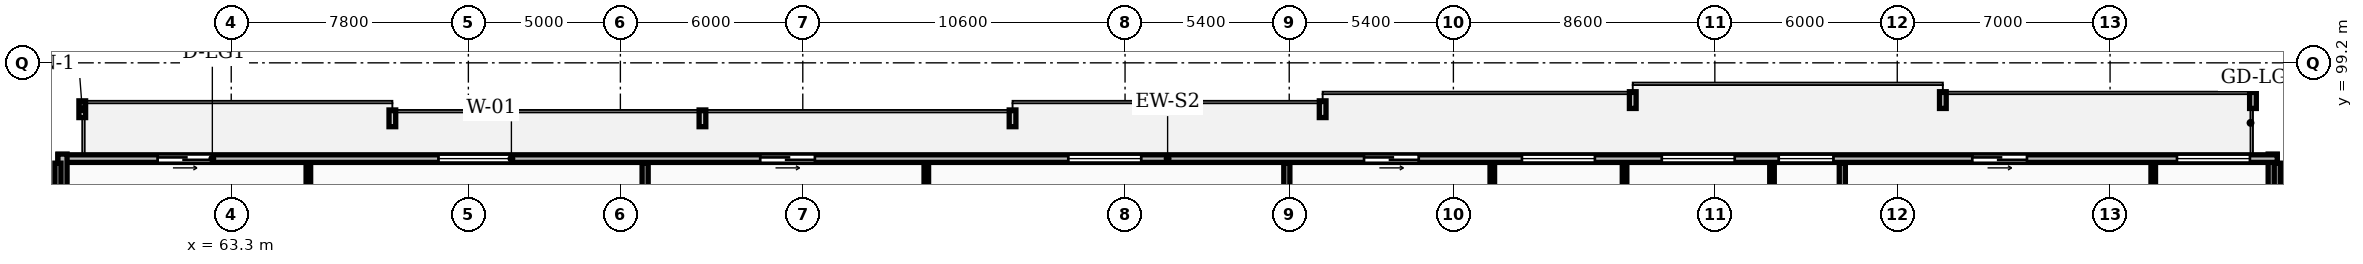
"""IFC4 building model, lengths in metres.
Left out: names, types, materials, properties, quantities, classifications, styles, units other than length and angle.
Written with IfcOpenShell. Run it as: python <this file> out.ifc"""

import sys

from ifc_helpers import new_model, si_unit, direction, frame, frame_2d, origin, place, context, subcontext, project, spatial, rectangle, extrude, element, fill, save


model = new_model("IFC4")
c1 = context("Model", 3, precision=1e-05, world=origin(), true_north=direction((0.0, 1.0)))
c2 = subcontext(c1, "Body", "Model", "MODEL_VIEW")
j1 = project(units=[si_unit("LENGTHUNIT", "METRE"), si_unit("PLANEANGLEUNIT", "RADIAN")], contexts=[c1])
p1 = place(None, origin())
s1 = spatial("IfcSite", under=j1, at=p1, CompositionType="ELEMENT")
p2 = place(p1, origin())
s2 = spatial("IfcBuilding", under=s1, at=p2, CompositionType="ELEMENT")
p3 = place(p2, frame((0.0, 0.0, 142.9)))
s3 = spatial("IfcBuildingStorey", under=s2, at=p3, CompositionType="ELEMENT", Elevation=142.9)
p4 = place(p3, frame((130.45, 92.6, 0.0), z_axis=(0.0, 0.0, 1.0), x_axis=(0.0, 1.0, 0.0)))
e1 = element("IfcWall", 1, at=p4, inside=s3, PredefinedType="STANDARD", context=c2, shape_type="SweptSolid", body=[
    extrude(rectangle(XDim=3.6, YDim=0.3, at=frame_2d((1.8, 0.0))), origin(), (0.0, 0.0, 1.0), 3.31),
])
p5 = place(p3, frame((130.6, 96.05, 0.0), z_axis=(0.0, 0.0, 1.0), x_axis=(-1.0, 0.0, 0.0)))
e2 = element("IfcWall", 2, at=p5, inside=s3, PredefinedType="STANDARD", context=c2, shape_type="SweptSolid", body=[
    extrude(rectangle(XDim=73.0, YDim=0.25, at=frame_2d((36.5, 0.0))), origin(), (0.0, 0.0, 1.0), 3.31),
])
p6 = place(p5, frame((67.921, 0.0, 0.0)))
e3 = element("IfcOpeningElement", 3, at=p6, cuts=e2, PredefinedType="OPENING", context=c2, shape_type="SweptSolid", body=[
    extrude(rectangle(XDim=1.8, YDim=2.2, at=frame_2d((0.9, 1.1))), frame((0.0, 0.135, 0.0), z_axis=(0.0, -1.0, 0.0), x_axis=(1.0, 0.0, 0.0)), (0.0, 0.0, 1.0), 0.27),
])
p7 = place(p5, frame((58.084, 0.0, 0.85)))
e4 = element("IfcOpeningElement", 4, at=p7, cuts=e2, PredefinedType="OPENING", context=c2, shape_type="SweptSolid", body=[
    extrude(rectangle(XDim=2.4, YDim=1.9, at=frame_2d((1.2, 0.95))), frame((0.0, 0.135, 0.0), z_axis=(0.0, -1.0, 0.0), x_axis=(1.0, 0.0, 0.0)), (0.0, 0.0, 1.0), 0.27),
])
p8 = place(p5, frame((48.101, 0.0, 0.0)))
e5 = element("IfcOpeningElement", 5, at=p8, cuts=e2, PredefinedType="OPENING", context=c2, shape_type="SweptSolid", body=[
    extrude(rectangle(XDim=1.8, YDim=2.2, at=frame_2d((0.9, 1.1))), frame((0.0, 0.135, 0.0), z_axis=(0.0, -1.0, 0.0), x_axis=(1.0, 0.0, 0.0)), (0.0, 0.0, 1.0), 0.27),
])
p9 = place(p5, frame((37.368, 0.0, 0.85)))
e6 = element("IfcOpeningElement", 6, at=p9, cuts=e2, PredefinedType="OPENING", context=c2, shape_type="SweptSolid", body=[
    extrude(rectangle(XDim=2.4, YDim=1.9, at=frame_2d((1.2, 0.95))), frame((0.0, 0.135, 0.0), z_axis=(0.0, -1.0, 0.0), x_axis=(1.0, 0.0, 0.0)), (0.0, 0.0, 1.0), 0.27),
])
p10 = place(p5, frame((22.445, 0.0, 0.85)))
e7 = element("IfcOpeningElement", 7, at=p10, cuts=e2, PredefinedType="OPENING", context=c2, shape_type="SweptSolid", body=[
    extrude(rectangle(XDim=2.4, YDim=1.9, at=frame_2d((1.2, 0.95))), frame((0.0, 0.135, 0.0), z_axis=(0.0, -1.0, 0.0), x_axis=(1.0, 0.0, 0.0)), (0.0, 0.0, 1.0), 0.27),
])
p11 = place(p5, frame((17.845, 0.0, 0.85)))
e8 = element("IfcOpeningElement", 8, at=p11, cuts=e2, PredefinedType="OPENING", context=c2, shape_type="SweptSolid", body=[
    extrude(rectangle(XDim=2.4, YDim=1.9, at=frame_2d((1.2, 0.95))), frame((0.0, 0.135, 0.0), z_axis=(0.0, -1.0, 0.0), x_axis=(1.0, 0.0, 0.0)), (0.0, 0.0, 1.0), 0.27),
])
p12 = place(p5, frame((28.239, 0.0, 0.0)))
e9 = element("IfcOpeningElement", 9, at=p12, cuts=e2, PredefinedType="OPENING", context=c2, shape_type="SweptSolid", body=[
    extrude(rectangle(XDim=1.8, YDim=2.2, at=frame_2d((0.9, 1.1))), frame((0.0, 0.135, 0.0), z_axis=(0.0, -1.0, 0.0), x_axis=(1.0, 0.0, 0.0)), (0.0, 0.0, 1.0), 0.27),
])
p13 = place(p5, frame((14.599, 0.0, 0.85)))
e10 = element("IfcOpeningElement", 10, at=p13, cuts=e2, PredefinedType="OPENING", context=c2, shape_type="SweptSolid", body=[
    extrude(rectangle(XDim=1.8, YDim=1.8, at=frame_2d((0.9, 0.9))), frame((0.0, 0.135, 0.0), z_axis=(0.0, -1.0, 0.0), x_axis=(1.0, 0.0, 0.0)), (0.0, 0.0, 1.0), 0.27),
])
p14 = place(p5, frame((8.234, 0.0, 0.0)))
e11 = element("IfcOpeningElement", 11, at=p14, cuts=e2, PredefinedType="OPENING", context=c2, shape_type="SweptSolid", body=[
    extrude(rectangle(XDim=1.8, YDim=2.2, at=frame_2d((0.9, 1.1))), frame((0.0, 0.135, 0.0), z_axis=(0.0, -1.0, 0.0), x_axis=(1.0, 0.0, 0.0)), (0.0, 0.0, 1.0), 0.27),
])
p15 = place(p5, frame((0.9, 0.0, 0.85)))
e12 = element("IfcOpeningElement", 12, at=p15, cuts=e2, PredefinedType="OPENING", context=c2, shape_type="SweptSolid", body=[
    extrude(rectangle(XDim=2.4, YDim=1.9, at=frame_2d((1.2, 0.95))), frame((0.0, 0.135, 0.0), z_axis=(0.0, -1.0, 0.0), x_axis=(1.0, 0.0, 0.0)), (0.0, 0.0, 1.0), 0.27),
])
p16 = place(p3, frame((57.75, 96.2, 0.0), z_axis=(0.0, 0.0, 1.0), x_axis=(0.0, -1.0, 0.0)))
e13 = element("IfcWall", 13, at=p16, inside=s3, PredefinedType="STANDARD", context=c2, shape_type="SweptSolid", body=[
    extrude(rectangle(XDim=3.6, YDim=0.3, at=frame_2d((1.8, 0.0))), origin(), (0.0, 0.0, 1.0), 3.31),
])
for number, where, z_axis, x_axis in (
    (14, (57.6, 69.83, 0.0), (0.0, 0.0, 1.0), (0.0, 1.0, 0.0)),
    (15, (130.6, 69.83, 0.0), (0.0, 0.0, 1.0), (0.0, 1.0, 0.0)),
    (16, (76.914, 69.83, 0.0), (0.0, 0.0, 1.0), (0.0, 1.0, 0.0)),
):
    element("IfcWall", number, at=place(p3, frame(where, z_axis=z_axis, x_axis=x_axis)), inside=s3, PredefinedType="PARTITIONING", context=c2, shape_type="SweptSolid", body=[
        extrude(rectangle(XDim=26.07, YDim=0.2, at=frame_2d((13.035, 0.0))), origin(), (0.0, 0.0, 1.0), 3.31),
    ])
p17 = place(p3, frame((65.837, 91.08, 0.0), z_axis=(0.0, 0.0, 1.0), x_axis=(0.0, 1.0, 0.0)))
e17 = element("IfcWall", 17, at=p17, inside=s3, PredefinedType="PARTITIONING", context=c2, shape_type="SweptSolid", body=[
    extrude(rectangle(XDim=4.82, YDim=0.15, at=frame_2d((2.41, 0.0))), origin(), (0.0, 0.0, 1.0), 3.31),
])
p18 = place(p3, frame((98.021, 69.83, 0.0), z_axis=(0.0, 0.0, 1.0), x_axis=(0.0, 1.0, 0.0)))
e18 = element("IfcWall", 18, at=p18, inside=s3, PredefinedType="PARTITIONING", context=c2, shape_type="SweptSolid", body=[
    extrude(rectangle(XDim=26.07, YDim=0.2, at=frame_2d((13.035, 0.0))), origin(), (0.0, 0.0, 1.0), 3.31),
])
p19 = place(p3, frame((86.163, 91.08, 0.0), z_axis=(0.0, 0.0, 1.0), x_axis=(0.0, 1.0, 0.0)))
e19 = element("IfcWall", 19, at=p19, inside=s3, PredefinedType="PARTITIONING", context=c2, shape_type="SweptSolid", body=[
    extrude(rectangle(XDim=4.82, YDim=0.15, at=frame_2d((2.41, 0.0))), origin(), (0.0, 0.0, 1.0), 3.31),
])
p20 = place(p3, frame((116.293, 69.83, 0.0), z_axis=(0.0, 0.0, 1.0), x_axis=(0.0, 1.0, 0.0)))
e20 = element("IfcWall", 20, at=p20, inside=s3, PredefinedType="PARTITIONING", context=c2, shape_type="SweptSolid", body=[
    extrude(rectangle(XDim=26.07, YDim=0.2, at=frame_2d((13.035, 0.0))), origin(), (0.0, 0.0, 1.0), 3.31),
])
p21 = place(p3, frame((109.13, 91.08, 0.0), z_axis=(0.0, 0.0, 1.0), x_axis=(0.0, 1.0, 0.0)))
e21 = element("IfcWall", 21, at=p21, inside=s3, PredefinedType="PARTITIONING", context=c2, shape_type="SweptSolid", body=[
    extrude(rectangle(XDim=4.82, YDim=0.15, at=frame_2d((2.41, 0.0))), origin(), (0.0, 0.0, 1.0), 3.31),
])
p22 = place(p3, frame((104.78, 85.94, 0.0), z_axis=(0.0, 0.0, 1.0), x_axis=(0.0, 1.0, 0.0)))
e22 = element("IfcWall", 22, at=p22, inside=s3, PredefinedType="PARTITIONING", context=c2, shape_type="SweptSolid", body=[
    extrude(rectangle(XDim=9.96, YDim=0.15, at=frame_2d((4.98, 0.0))), origin(), (0.0, 0.0, 1.0), 3.31),
])
p23 = place(p22, frame((2.936, 0.0, 0.0)))
e23 = element("IfcOpeningElement", 23, at=p23, cuts=e22, PredefinedType="OPENING", context=c2, shape_type="SweptSolid", body=[
    extrude(rectangle(XDim=0.92, YDim=2.08, at=frame_2d((0.46, 1.04))), frame((0.0, 0.085, 0.0), z_axis=(0.0, -1.0, 0.0), x_axis=(1.0, 0.0, 0.0)), (0.0, 0.0, 1.0), 0.17),
])
p24 = place(p3, frame((113.98, 88.67, 0.0), z_axis=(0.0, 0.0, 1.0), x_axis=(0.0, 1.0, 0.0)))
e24 = element("IfcWall", 24, at=p24, inside=s3, PredefinedType="PARTITIONING", context=c2, shape_type="SweptSolid", body=[
    extrude(rectangle(XDim=7.23, YDim=0.15, at=frame_2d((3.615, 0.0))), origin(), (0.0, 0.0, 1.0), 3.31),
])
p25 = place(p24, frame((0.26, 0.0, 0.0)))
e25 = element("IfcOpeningElement", 25, at=p25, cuts=e24, PredefinedType="OPENING", context=c2, shape_type="SweptSolid", body=[
    extrude(rectangle(XDim=0.92, YDim=2.08, at=frame_2d((0.46, 1.04))), frame((0.0, 0.085, 0.0), z_axis=(0.0, -1.0, 0.0), x_axis=(1.0, 0.0, 0.0)), (0.0, 0.0, 1.0), 0.17),
])
p26 = place(p3, frame((126.52, 85.94, 0.0), z_axis=(0.0, 0.0, 1.0), x_axis=(0.0, 1.0, 0.0)))
e26 = element("IfcWall", 26, at=p26, inside=s3, PredefinedType="PARTITIONING", context=c2, shape_type="SweptSolid", body=[
    extrude(rectangle(XDim=9.96, YDim=0.15, at=frame_2d((4.98, 0.0))), origin(), (0.0, 0.0, 1.0), 3.31),
])
p27 = place(p26, frame((1.43, 0.0, 0.0)))
e27 = element("IfcOpeningElement", 27, at=p27, cuts=e26, PredefinedType="OPENING", context=c2, shape_type="SweptSolid", body=[
    extrude(rectangle(XDim=0.84, YDim=2.04, at=frame_2d((0.42, 1.02))), frame((0.0, 0.085, 0.0), z_axis=(0.0, -1.0, 0.0), x_axis=(1.0, 0.0, 0.0)), (0.0, 0.0, 1.0), 0.17),
])
p28 = place(p26, frame((3.002, 0.0, 0.0)))
e28 = element("IfcOpeningElement", 28, at=p28, cuts=e26, PredefinedType="OPENING", context=c2, shape_type="SweptSolid", body=[
    extrude(rectangle(XDim=0.84, YDim=2.04, at=frame_2d((0.42, 1.02))), frame((0.0, 0.085, 0.0), z_axis=(0.0, -1.0, 0.0), x_axis=(1.0, 0.0, 0.0)), (0.0, 0.0, 1.0), 0.17),
])
p29 = place(p26, frame((6.669, 0.0, 0.0)))
e29 = element("IfcOpeningElement", 29, at=p29, cuts=e26, PredefinedType="OPENING", context=c2, shape_type="SweptSolid", body=[
    extrude(rectangle(XDim=0.88, YDim=2.06, at=frame_2d((0.44, 1.03))), frame((0.0, 0.085, 0.0), z_axis=(0.0, -1.0, 0.0), x_axis=(1.0, 0.0, 0.0)), (0.0, 0.0, 1.0), 0.17),
])
p30 = place(p6, origin())
e30 = element("IfcDoor", 30, at=p30, inside=s3, OperationType="SLIDING_TO_LEFT", PredefinedType="DOOR", context=c2, shape_type="SweptSolid", body=[
    extrude(rectangle(XDim=1.8, YDim=2.2, at=frame_2d((0.9, 1.1))), frame((0.0, 0.025, 0.0), z_axis=(0.0, -1.0, 0.0), x_axis=(1.0, 0.0, 0.0)), (0.0, 0.0, 1.0), 0.05),
])
fill(e3, e30)
p31 = place(p7, origin())
e31 = element("IfcWindow", 31, at=p31, inside=s3, PartitioningType="DOUBLE_PANEL_VERTICAL", PredefinedType="WINDOW", context=c2, shape_type="SweptSolid", body=[
    extrude(rectangle(XDim=2.4, YDim=1.9, at=frame_2d((1.2, 0.95))), frame((0.0, 0.03, 0.0), z_axis=(0.0, -1.0, 0.0), x_axis=(1.0, 0.0, 0.0)), (0.0, 0.0, 1.0), 0.06),
])
fill(e4, e31)
p32 = place(p8, origin())
e32 = element("IfcDoor", 32, at=p32, inside=s3, OperationType="SLIDING_TO_LEFT", PredefinedType="DOOR", context=c2, shape_type="SweptSolid", body=[
    extrude(rectangle(XDim=1.8, YDim=2.2, at=frame_2d((0.9, 1.1))), frame((0.0, 0.025, 0.0), z_axis=(0.0, -1.0, 0.0), x_axis=(1.0, 0.0, 0.0)), (0.0, 0.0, 1.0), 0.05),
])
fill(e5, e32)
p33 = place(p9, origin())
e33 = element("IfcWindow", 33, at=p33, inside=s3, PartitioningType="DOUBLE_PANEL_VERTICAL", PredefinedType="WINDOW", context=c2, shape_type="SweptSolid", body=[
    extrude(rectangle(XDim=2.4, YDim=1.9, at=frame_2d((1.2, 0.95))), frame((0.0, 0.03, 0.0), z_axis=(0.0, -1.0, 0.0), x_axis=(1.0, 0.0, 0.0)), (0.0, 0.0, 1.0), 0.06),
])
fill(e6, e33)
p34 = place(p10, origin())
e34 = element("IfcWindow", 34, at=p34, inside=s3, PartitioningType="DOUBLE_PANEL_VERTICAL", PredefinedType="WINDOW", context=c2, shape_type="SweptSolid", body=[
    extrude(rectangle(XDim=2.4, YDim=1.9, at=frame_2d((1.2, 0.95))), frame((0.0, 0.03, 0.0), z_axis=(0.0, -1.0, 0.0), x_axis=(1.0, 0.0, 0.0)), (0.0, 0.0, 1.0), 0.06),
])
fill(e7, e34)
p35 = place(p11, origin())
e35 = element("IfcWindow", 35, at=p35, inside=s3, PartitioningType="DOUBLE_PANEL_VERTICAL", PredefinedType="WINDOW", context=c2, shape_type="SweptSolid", body=[
    extrude(rectangle(XDim=2.4, YDim=1.9, at=frame_2d((1.2, 0.95))), frame((0.0, 0.03, 0.0), z_axis=(0.0, -1.0, 0.0), x_axis=(1.0, 0.0, 0.0)), (0.0, 0.0, 1.0), 0.06),
])
fill(e8, e35)
p36 = place(p12, origin())
e36 = element("IfcDoor", 36, at=p36, inside=s3, OperationType="SLIDING_TO_LEFT", PredefinedType="DOOR", context=c2, shape_type="SweptSolid", body=[
    extrude(rectangle(XDim=1.8, YDim=2.2, at=frame_2d((0.9, 1.1))), frame((0.0, 0.025, 0.0), z_axis=(0.0, -1.0, 0.0), x_axis=(1.0, 0.0, 0.0)), (0.0, 0.0, 1.0), 0.05),
])
fill(e9, e36)
p37 = place(p13, origin())
e37 = element("IfcWindow", 37, at=p37, inside=s3, PartitioningType="SINGLE_PANEL", PredefinedType="WINDOW", context=c2, shape_type="SweptSolid", body=[
    extrude(rectangle(XDim=1.8, YDim=1.8, at=frame_2d((0.9, 0.9))), frame((0.0, 0.03, 0.0), z_axis=(0.0, -1.0, 0.0), x_axis=(1.0, 0.0, 0.0)), (0.0, 0.0, 1.0), 0.06),
])
fill(e10, e37)
p38 = place(p14, origin())
e38 = element("IfcDoor", 38, at=p38, inside=s3, OperationType="SLIDING_TO_LEFT", PredefinedType="DOOR", context=c2, shape_type="SweptSolid", body=[
    extrude(rectangle(XDim=1.8, YDim=2.2, at=frame_2d((0.9, 1.1))), frame((0.0, 0.025, 0.0), z_axis=(0.0, -1.0, 0.0), x_axis=(1.0, 0.0, 0.0)), (0.0, 0.0, 1.0), 0.05),
])
fill(e11, e38)
p39 = place(p15, origin())
e39 = element("IfcWindow", 39, at=p39, inside=s3, PartitioningType="DOUBLE_PANEL_VERTICAL", PredefinedType="WINDOW", context=c2, shape_type="SweptSolid", body=[
    extrude(rectangle(XDim=2.4, YDim=1.9, at=frame_2d((1.2, 0.95))), frame((0.0, 0.03, 0.0), z_axis=(0.0, -1.0, 0.0), x_axis=(1.0, 0.0, 0.0)), (0.0, 0.0, 1.0), 0.06),
])
fill(e12, e39)
save(model, sys.argv[1])
